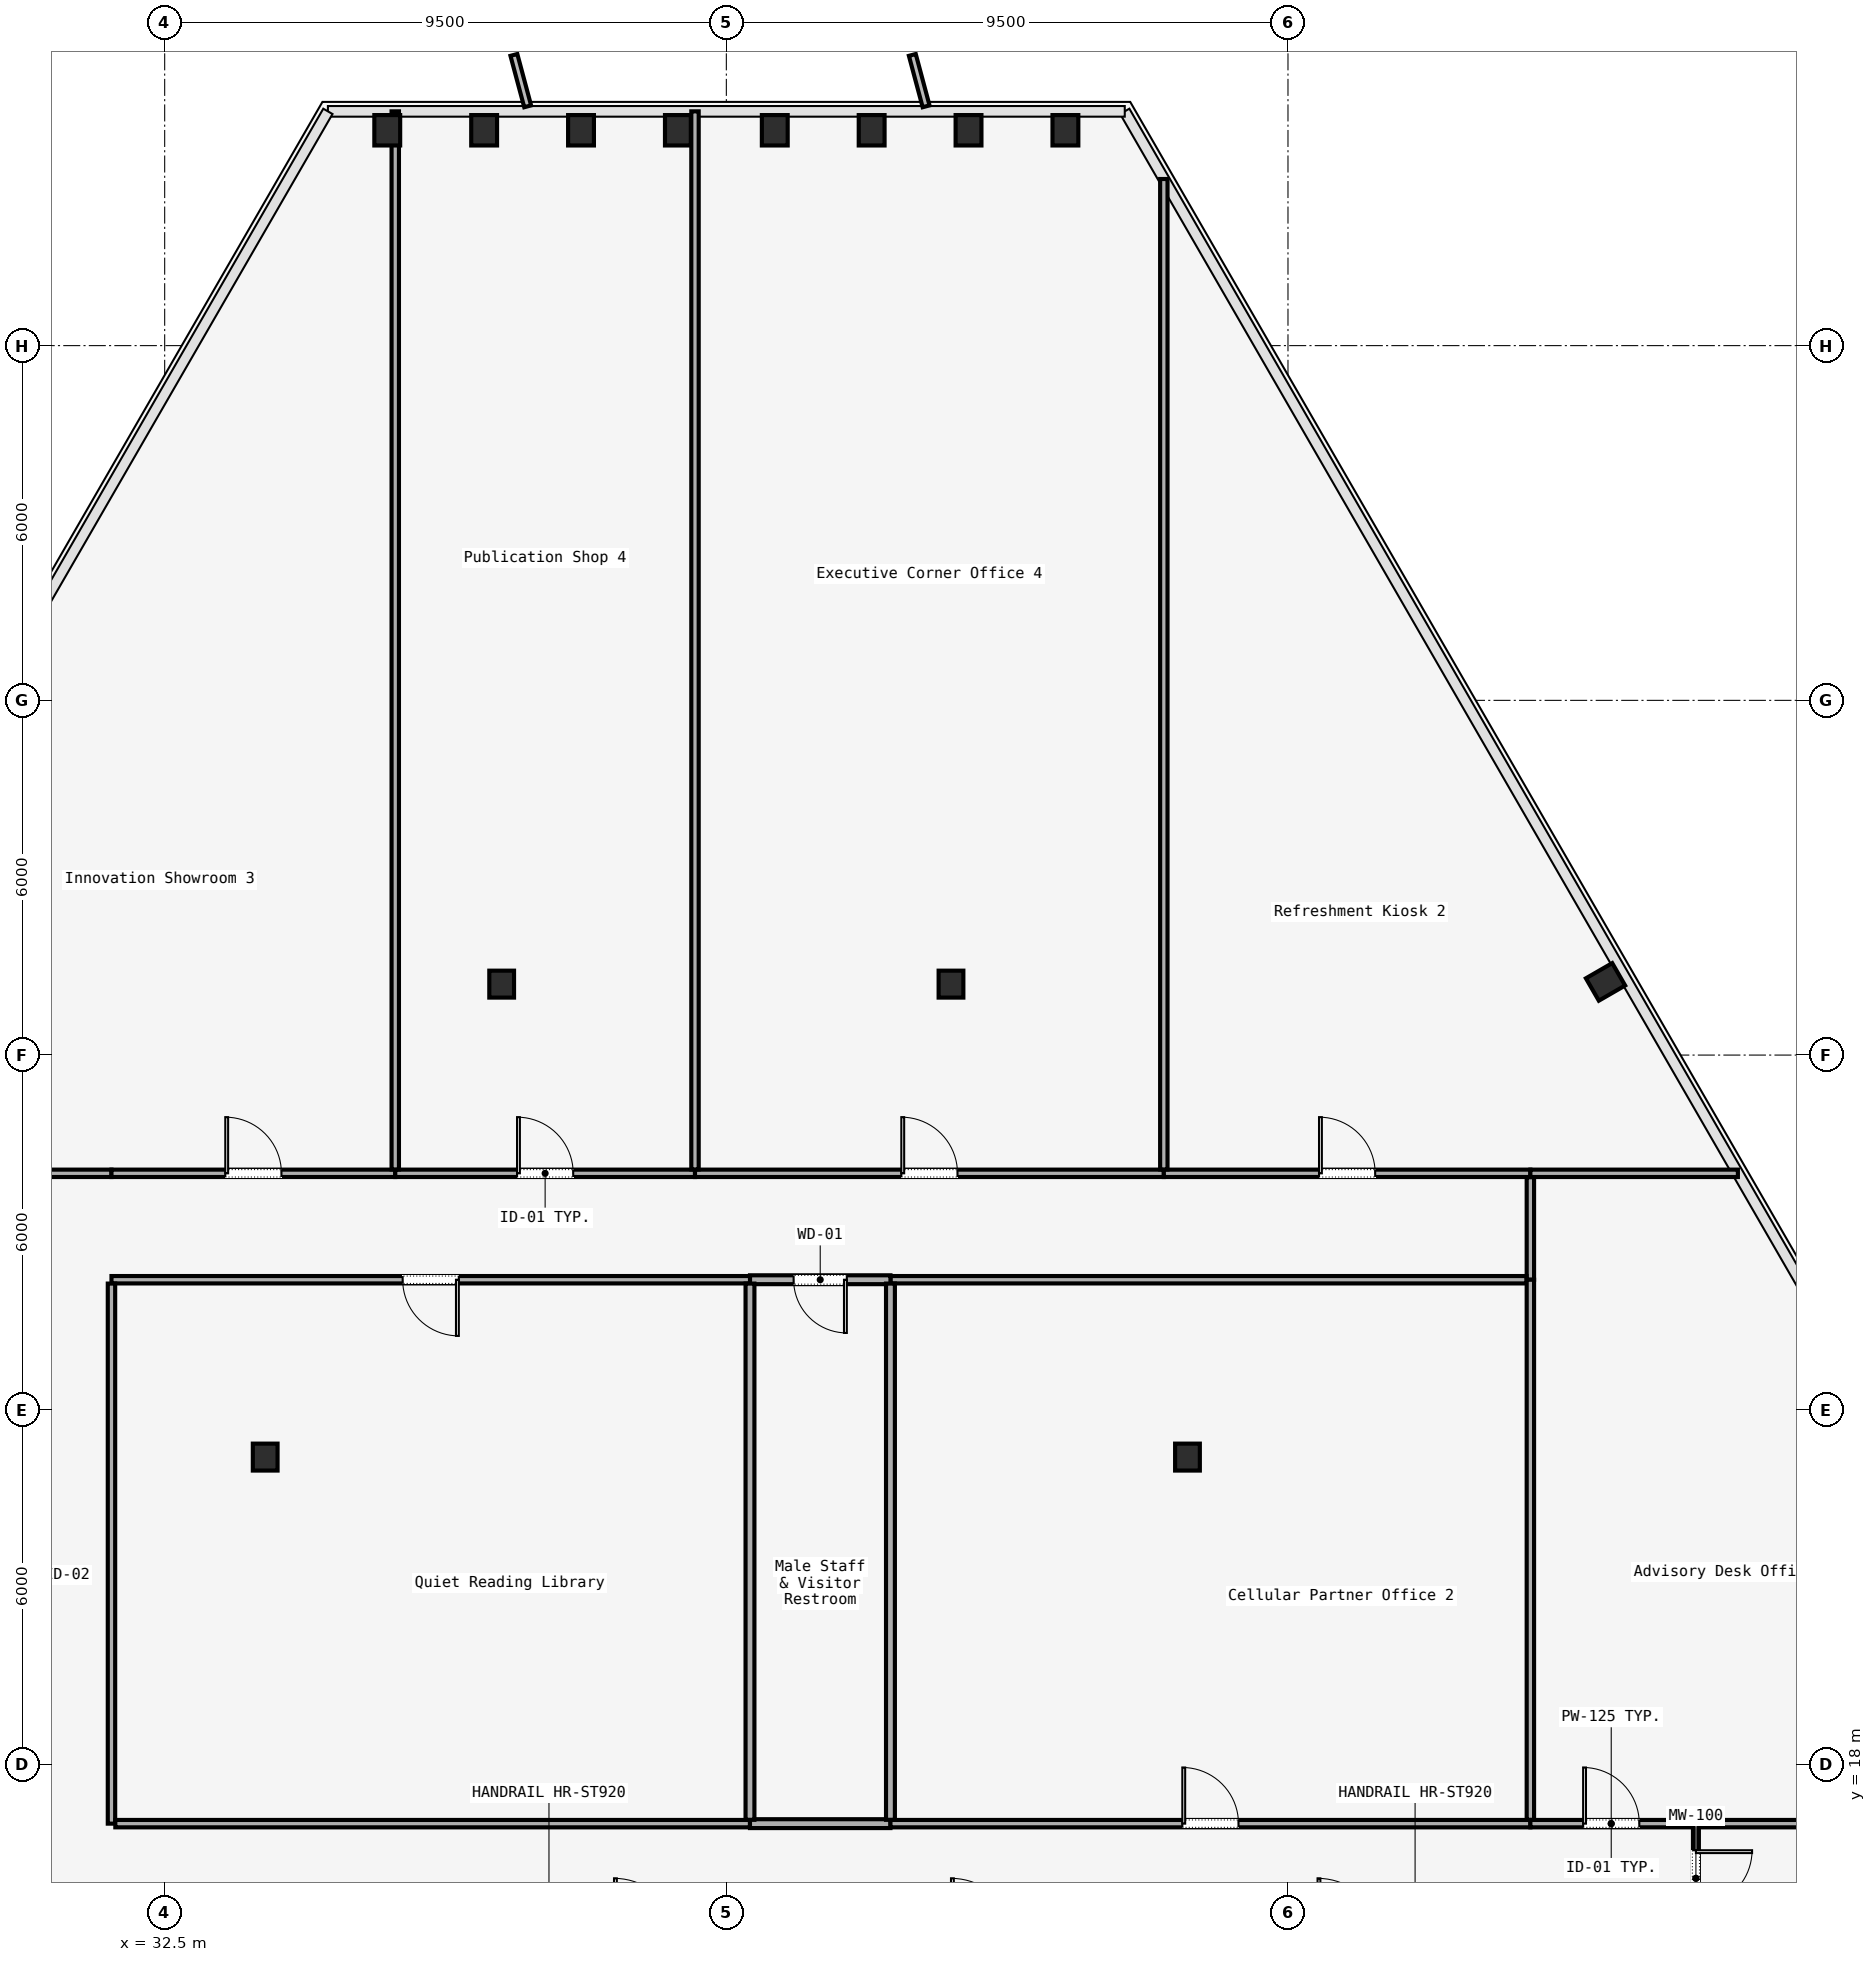
"""IFC4 building model, lengths in metres.
Left out: names, types, materials, properties, quantities, classifications, styles, units other than length and angle.
Written with IfcOpenShell. Run it as: python <this file> out.ifc"""

import sys

from ifc_helpers import new_model, si_unit, direction, frame, frame_2d, origin, origin_2d, place, context, subcontext, project, spatial, rectangle, i_section, extrude, element, fill, save


model = new_model("IFC4")
c1 = context("Model", 3, precision=1e-05, world=origin(), true_north=direction((0.0, 1.0)))
c2 = subcontext(c1, "Body", "Model", "MODEL_VIEW")
j1 = project(units=[si_unit("LENGTHUNIT", "METRE"), si_unit("PLANEANGLEUNIT", "RADIAN")], contexts=[c1])
p1 = place(None, origin())
s1 = spatial("IfcSite", under=j1, at=p1, CompositionType="ELEMENT")
p2 = place(p1, origin())
s2 = spatial("IfcBuilding", under=s1, at=p2, CompositionType="ELEMENT")
p3 = place(p2, frame((0.0, 0.0, 100.6)))
s3 = spatial("IfcBuildingStorey", under=s2, at=p3, CompositionType="ELEMENT", Elevation=100.6)
for number, where, z_axis, x_axis in (
    (1, (34.2, 23.2, 0.0), (0.0, 0.0, 1.0), (1.0, 0.0, 0.0)),
    (2, (49.8, 23.2, 0.0), (0.0, 0.0, 1.0), (1.0, 0.0, 0.0)),
    (3, (38.2, 31.2, 0.0), (0.0, 0.0, 1.0), (1.0, 0.0, 0.0)),
    (4, (45.8, 31.2, 0.0), (0.0, 0.0, 1.0), (1.0, 0.0, 0.0)),
):
    element("IfcColumn", number, at=place(p3, frame(where, z_axis=z_axis, x_axis=x_axis)), inside=s3, PredefinedType="COLUMN", context=c2, shape_type="SweptSolid", body=[
        extrude(i_section(OverallWidth=0.418, OverallDepth=0.456, WebThickness=0.042, FlangeThickness=0.067, FilletRadius=0.015, at=origin_2d()), origin(), (0.0, 0.0, 1.0), 3.58),
    ])
for number, where, z_axis, x_axis in (
    (5, (56.871, 31.238, 0.0), (0.0, 0.0, 1.0), (-0.5, 0.866, 0.0)),
    (6, (47.735, 45.643, 0.0), (0.0, 0.0, 1.0), (1.0, 0.0, 0.0)),
    (7, (46.097, 45.643, 0.0), (0.0, 0.0, 1.0), (1.0, 0.0, 0.0)),
    (8, (44.458, 45.643, 0.0), (0.0, 0.0, 1.0), (1.0, 0.0, 0.0)),
    (9, (42.819, 45.643, 0.0), (0.0, 0.0, 1.0), (1.0, 0.0, 0.0)),
    (10, (41.181, 45.643, 0.0), (0.0, 0.0, 1.0), (1.0, 0.0, 0.0)),
    (11, (39.542, 45.643, 0.0), (0.0, 0.0, 1.0), (1.0, 0.0, 0.0)),
    (12, (37.903, 45.643, 0.0), (0.0, 0.0, 1.0), (1.0, 0.0, 0.0)),
    (13, (36.265, 45.643, 0.0), (0.0, 0.0, 1.0), (1.0, 0.0, 0.0)),
):
    element("IfcColumn", number, at=place(p3, frame(where, z_axis=z_axis, x_axis=x_axis)), inside=s3, PredefinedType="COLUMN", context=c2, shape_type="SweptSolid", body=[
        extrude(i_section(OverallWidth=0.437, OverallDepth=0.514, WebThickness=0.061, FlangeThickness=0.077, FilletRadius=0.015, at=origin_2d()), origin(), (0.0, 0.0, 1.0), 3.58),
    ])
p4 = place(p3, frame((58.4, 17.0, 0.0), z_axis=(0.0, 0.0, 1.0), x_axis=(0.0, -1.0, 0.0)))
e14 = element("IfcWall", 14, at=p4, inside=s3, PredefinedType="MOVABLE", context=c2, shape_type="SweptSolid", body=[
    extrude(rectangle(XDim=1.85, YDim=0.1, at=frame_2d((0.925, 0.0))), origin(), (0.0, 0.0, 1.0), 2.95),
])
p5 = place(p4, frame((0.45, 0.0, 0.0)))
e15 = element("IfcOpeningElement", 15, at=p5, cuts=e14, PredefinedType="OPENING", context=c2, shape_type="SweptSolid", body=[
    extrude(rectangle(XDim=0.95, YDim=2.2, at=frame_2d((0.475, 1.1))), frame((0.0, 0.05, 0.0), z_axis=(0.0, -1.0, 0.0), x_axis=(1.0, 0.0, 0.0)), (0.0, 0.0, 1.0), 0.1),
])
p6 = place(p3, frame((29.865, 28.0, 0.0), z_axis=(0.0, 0.0, 1.0), x_axis=(1.0, 0.0, 0.0)))
e16 = element("IfcWall", 16, at=p6, inside=s3, PredefinedType="PARTITIONING", context=c2, shape_type="SweptSolid", body=[
    extrude(rectangle(XDim=1.735, YDim=0.125, at=frame_2d((0.868, 0.0))), origin(), (0.0, 0.0, 1.0), 2.95),
])
p7 = place(p3, frame((31.6, 28.0, 0.0), z_axis=(0.0, 0.0, 1.0), x_axis=(1.0, 0.0, 0.0)))
e17 = element("IfcWall", 17, at=p7, inside=s3, PredefinedType="PARTITIONING", context=c2, shape_type="SweptSolid", body=[
    extrude(rectangle(XDim=4.8, YDim=0.125, at=frame_2d((2.4, 0.0))), origin(), (0.0, 0.0, 1.0), 2.95),
])
p8 = place(p7, frame((1.925, 0.0, 0.0)))
e18 = element("IfcOpeningElement", 18, at=p8, cuts=e17, PredefinedType="OPENING", context=c2, shape_type="SweptSolid", body=[
    extrude(rectangle(XDim=0.95, YDim=2.2, at=frame_2d((0.475, 1.1))), frame((0.0, 0.062, 0.0), z_axis=(0.0, -1.0, 0.0), x_axis=(1.0, 0.0, 0.0)), (0.0, 0.0, 1.0), 0.125),
])
p9 = place(p3, frame((36.4, 28.0, 0.0), z_axis=(0.0, 0.0, 1.0), x_axis=(1.0, 0.0, 0.0)))
e19 = element("IfcWall", 19, at=p9, inside=s3, PredefinedType="PARTITIONING", context=c2, shape_type="SweptSolid", body=[
    extrude(rectangle(XDim=5.07, YDim=0.125, at=frame_2d((2.535, 0.0))), origin(), (0.0, 0.0, 1.0), 2.95),
])
p10 = place(p9, frame((2.06, 0.0, 0.0)))
e20 = element("IfcOpeningElement", 20, at=p10, cuts=e19, PredefinedType="OPENING", context=c2, shape_type="SweptSolid", body=[
    extrude(rectangle(XDim=0.95, YDim=2.2, at=frame_2d((0.475, 1.1))), frame((0.0, 0.062, 0.0), z_axis=(0.0, -1.0, 0.0), x_axis=(1.0, 0.0, 0.0)), (0.0, 0.0, 1.0), 0.125),
])
p11 = place(p3, frame((41.47, 28.0, 0.0), z_axis=(0.0, 0.0, 1.0), x_axis=(1.0, 0.0, 0.0)))
e21 = element("IfcWall", 21, at=p11, inside=s3, PredefinedType="PARTITIONING", context=c2, shape_type="SweptSolid", body=[
    extrude(rectangle(XDim=7.93, YDim=0.125, at=frame_2d((3.965, 0.0))), origin(), (0.0, 0.0, 1.0), 2.95),
])
p12 = place(p11, frame((3.49, 0.0, 0.0)))
e22 = element("IfcOpeningElement", 22, at=p12, cuts=e21, PredefinedType="OPENING", context=c2, shape_type="SweptSolid", body=[
    extrude(rectangle(XDim=0.95, YDim=2.2, at=frame_2d((0.475, 1.1))), frame((0.0, 0.062, 0.0), z_axis=(0.0, -1.0, 0.0), x_axis=(1.0, 0.0, 0.0)), (0.0, 0.0, 1.0), 0.125),
])
p13 = place(p3, frame((49.4, 28.0, 0.0), z_axis=(0.0, 0.0, 1.0), x_axis=(1.0, 0.0, 0.0)))
e23 = element("IfcWall", 23, at=p13, inside=s3, PredefinedType="PARTITIONING", context=c2, shape_type="SweptSolid", body=[
    extrude(rectangle(XDim=6.2, YDim=0.125, at=frame_2d((3.1, 0.0))), origin(), (0.0, 0.0, 1.0), 2.95),
])
p14 = place(p13, frame((2.625, 0.0, 0.0)))
e24 = element("IfcOpeningElement", 24, at=p14, cuts=e23, PredefinedType="OPENING", context=c2, shape_type="SweptSolid", body=[
    extrude(rectangle(XDim=0.95, YDim=2.2, at=frame_2d((0.475, 1.1))), frame((0.0, 0.062, 0.0), z_axis=(0.0, -1.0, 0.0), x_axis=(1.0, 0.0, 0.0)), (0.0, 0.0, 1.0), 0.125),
])
p15 = place(p3, frame((55.6, 27.935, 0.0), z_axis=(0.0, 0.0, 1.0), x_axis=(0.0, -1.0, 0.0)))
e25 = element("IfcWall", 25, at=p15, inside=s3, PredefinedType="PARTITIONING", context=c2, shape_type="SweptSolid", body=[
    extrude(rectangle(XDim=1.735, YDim=0.125, at=frame_2d((0.868, 0.0))), origin(), (0.0, 0.0, 1.0), 2.95),
])
p16 = place(p3, frame((55.535, 26.2, 0.0), z_axis=(0.0, 0.0, 1.0), x_axis=(-1.0, 0.0, 0.0)))
e26 = element("IfcWall", 26, at=p16, inside=s3, PredefinedType="PARTITIONING", context=c2, shape_type="SweptSolid", body=[
    extrude(rectangle(XDim=10.759, YDim=0.125, at=frame_2d((5.379, 0.0))), origin(), (0.0, 0.0, 1.0), 2.95),
])
p17 = place(p3, frame((44.776, 26.2, 0.0), z_axis=(0.0, 0.0, 1.0), x_axis=(-1.0, 0.0, 0.0)))
e27 = element("IfcWall", 27, at=p17, inside=s3, PredefinedType="PARTITIONING", context=c2, shape_type="SweptSolid", body=[
    extrude(rectangle(XDim=2.376, YDim=0.15, at=frame_2d((1.188, 0.0))), origin(), (0.0, 0.0, 1.0), 2.95),
])
p18 = place(p17, frame((0.738, 0.0, 0.0)))
e28 = element("IfcOpeningElement", 28, at=p18, cuts=e27, PredefinedType="OPENING", context=c2, shape_type="SweptSolid", body=[
    extrude(rectangle(XDim=0.9, YDim=2.15, at=frame_2d((0.45, 1.075))), frame((0.0, 0.075, 0.0), z_axis=(0.0, -1.0, 0.0), x_axis=(1.0, 0.0, 0.0)), (0.0, 0.0, 1.0), 0.15),
])
p19 = place(p3, frame((42.4, 26.2, 0.0), z_axis=(0.0, 0.0, 1.0), x_axis=(-1.0, 0.0, 0.0)))
e29 = element("IfcWall", 29, at=p19, inside=s3, PredefinedType="PARTITIONING", context=c2, shape_type="SweptSolid", body=[
    extrude(rectangle(XDim=10.8, YDim=0.125, at=frame_2d((5.4, 0.0))), origin(), (0.0, 0.0, 1.0), 2.95),
])
p20 = place(p19, frame((4.925, 0.0, 0.0)))
e30 = element("IfcOpeningElement", 30, at=p20, cuts=e29, PredefinedType="OPENING", context=c2, shape_type="SweptSolid", body=[
    extrude(rectangle(XDim=0.95, YDim=2.2, at=frame_2d((0.475, 1.1))), frame((0.0, 0.062, 0.0), z_axis=(0.0, -1.0, 0.0), x_axis=(1.0, 0.0, 0.0)), (0.0, 0.0, 1.0), 0.125),
])
p21 = place(p3, frame((31.6, 26.135, 0.0), z_axis=(0.0, 0.0, 1.0), x_axis=(0.0, -1.0, 0.0)))
e31 = element("IfcWall", 31, at=p21, inside=s3, PredefinedType="PARTITIONING", context=c2, shape_type="SweptSolid", body=[
    extrude(rectangle(XDim=9.135, YDim=0.125, at=frame_2d((4.567, 0.0))), origin(), (0.0, 0.0, 1.0), 2.95),
])
p22 = place(p3, frame((31.665, 17.0, 0.0), z_axis=(0.0, 0.0, 1.0), x_axis=(1.0, 0.0, 0.0)))
e32 = element("IfcWall", 32, at=p22, inside=s3, PredefinedType="PARTITIONING", context=c2, shape_type="SweptSolid", body=[
    extrude(rectangle(XDim=10.735, YDim=0.125, at=frame_2d((5.367, 0.0))), origin(), (0.0, 0.0, 1.0), 2.95),
])
p23 = place(p3, frame((42.4, 17.0, 0.0), z_axis=(0.0, 0.0, 1.0), x_axis=(1.0, 0.0, 0.0)))
e33 = element("IfcWall", 33, at=p23, inside=s3, PredefinedType="PARTITIONING", context=c2, shape_type="SweptSolid", body=[
    extrude(rectangle(XDim=2.376, YDim=0.15, at=frame_2d((1.188, 0.0))), origin(), (0.0, 0.0, 1.0), 2.95),
])
p24 = place(p3, frame((44.776, 17.0, 0.0), z_axis=(0.0, 0.0, 1.0), x_axis=(1.0, 0.0, 0.0)))
e34 = element("IfcWall", 34, at=p24, inside=s3, PredefinedType="PARTITIONING", context=c2, shape_type="SweptSolid", body=[
    extrude(rectangle(XDim=10.824, YDim=0.125, at=frame_2d((5.412, 0.0))), origin(), (0.0, 0.0, 1.0), 2.95),
])
p25 = place(p24, frame((4.937, 0.0, 0.0)))
e35 = element("IfcOpeningElement", 35, at=p25, cuts=e34, PredefinedType="OPENING", context=c2, shape_type="SweptSolid", body=[
    extrude(rectangle(XDim=0.95, YDim=2.2, at=frame_2d((0.475, 1.1))), frame((0.0, 0.062, 0.0), z_axis=(0.0, -1.0, 0.0), x_axis=(1.0, 0.0, 0.0)), (0.0, 0.0, 1.0), 0.125),
])
p26 = place(p3, frame((55.6, 17.0, 0.0), z_axis=(0.0, 0.0, 1.0), x_axis=(1.0, 0.0, 0.0)))
e36 = element("IfcWall", 36, at=p26, inside=s3, PredefinedType="PARTITIONING", context=c2, shape_type="SweptSolid", body=[
    extrude(rectangle(XDim=2.735, YDim=0.125, at=frame_2d((1.367, 0.0))), origin(), (0.0, 0.0, 1.0), 2.95),
])
p27 = place(p26, frame((0.893, 0.0, 0.0)))
e37 = element("IfcOpeningElement", 37, at=p27, cuts=e36, PredefinedType="OPENING", context=c2, shape_type="SweptSolid", body=[
    extrude(rectangle(XDim=0.95, YDim=2.2, at=frame_2d((0.475, 1.1))), frame((0.0, 0.062, 0.0), z_axis=(0.0, -1.0, 0.0), x_axis=(1.0, 0.0, 0.0)), (0.0, 0.0, 1.0), 0.125),
])
p28 = place(p3, frame((58.465, 17.0, 0.0), z_axis=(0.0, 0.0, 1.0), x_axis=(1.0, 0.0, 0.0)))
e38 = element("IfcWall", 38, at=p28, inside=s3, PredefinedType="PARTITIONING", context=c2, shape_type="SweptSolid", body=[
    extrude(rectangle(XDim=2.735, YDim=0.125, at=frame_2d((1.367, 0.0))), origin(), (0.0, 0.0, 1.0), 2.95),
])
for number, where, z_axis, x_axis in (
    (39, (42.4, 26.135, 0.0), (0.0, 0.0, 1.0), (0.0, -1.0, 0.0)),
    (40, (44.776, 26.135, 0.0), (0.0, 0.0, 1.0), (0.0, -1.0, 0.0)),
):
    element("IfcWall", number, at=place(p3, frame(where, z_axis=z_axis, x_axis=x_axis)), inside=s3, PredefinedType="PARTITIONING", context=c2, shape_type="SweptSolid", body=[
        extrude(rectangle(XDim=9.07, YDim=0.15, at=frame_2d((4.535, 0.0))), origin(), (0.0, 0.0, 1.0), 2.95),
    ])
p29 = place(p3, frame((55.6, 26.2, 0.0), z_axis=(0.0, 0.0, 1.0), x_axis=(0.0, -1.0, 0.0)))
e41 = element("IfcWall", 41, at=p29, inside=s3, PredefinedType="PARTITIONING", context=c2, shape_type="SweptSolid", body=[
    extrude(rectangle(XDim=9.135, YDim=0.125, at=frame_2d((4.567, 0.0))), origin(), (0.0, 0.0, 1.0), 2.95),
])
p30 = place(p3, frame((55.6, 28.0, 0.0), z_axis=(0.0, 0.0, 1.0), x_axis=(1.0, 0.0, 0.0)))
e42 = element("IfcWall", 42, at=p30, inside=s3, PredefinedType="PARTITIONING", context=c2, shape_type="SweptSolid", body=[
    extrude(rectangle(XDim=3.51, YDim=0.125, at=frame_2d((1.755, 0.0))), origin(), (0.0, 0.0, 1.0), 2.95),
])
p31 = place(p3, frame((49.4, 28.065, 0.0), z_axis=(0.0, 0.0, 1.0), x_axis=(0.0, 1.0, 0.0)))
e43 = element("IfcWall", 43, at=p31, inside=s3, PredefinedType="PARTITIONING", context=c2, shape_type="SweptSolid", body=[
    extrude(rectangle(XDim=16.753, YDim=0.125, at=frame_2d((8.377, 0.0))), origin(), (0.0, 0.0, 1.0), 2.95),
])
for number, where, z_axis, x_axis in (
    (44, (36.4, 45.963, 0.0), (0.0, 0.0, 1.0), (0.0, -1.0, 0.0)),
    (45, (41.47, 28.065, 0.0), (0.0, 0.0, 1.0), (0.0, 1.0, 0.0)),
):
    element("IfcWall", number, at=place(p3, frame(where, z_axis=z_axis, x_axis=x_axis)), inside=s3, PredefinedType="PARTITIONING", context=c2, shape_type="SweptSolid", body=[
        extrude(rectangle(XDim=17.898, YDim=0.125, at=frame_2d((8.949, 0.0))), origin(), (0.0, 0.0, 1.0), 2.95),
    ])
p32 = place(p5, origin())
e46 = element("IfcDoor", 46, at=p32, inside=s3, OperationType="SINGLE_SWING_LEFT", PredefinedType="DOOR", context=c2, shape_type="SweptSolid", body=[
    extrude(rectangle(XDim=0.95, YDim=2.2, at=frame_2d((0.475, 1.1))), frame((0.0, 0.025, 0.0), z_axis=(0.0, -1.0, 0.0), x_axis=(1.0, 0.0, 0.0)), (0.0, 0.0, 1.0), 0.05),
])
fill(e15, e46)
p33 = place(p20, origin())
e47 = element("IfcDoor", 47, at=p33, inside=s3, OperationType="SINGLE_SWING_LEFT", PredefinedType="DOOR", context=c2, shape_type="SweptSolid", body=[
    extrude(rectangle(XDim=0.95, YDim=2.2, at=frame_2d((0.475, 1.1))), frame((0.0, 0.025, 0.0), z_axis=(0.0, -1.0, 0.0), x_axis=(1.0, 0.0, 0.0)), (0.0, 0.0, 1.0), 0.05),
])
fill(e30, e47)
p34 = place(p18, origin())
e48 = element("IfcDoor", 48, at=p34, inside=s3, OperationType="SINGLE_SWING_RIGHT", PredefinedType="DOOR", context=c2, shape_type="SweptSolid", body=[
    extrude(rectangle(XDim=0.9, YDim=2.15, at=frame_2d((0.45, 1.075))), frame((0.0, 0.025, 0.0), z_axis=(0.0, -1.0, 0.0), x_axis=(1.0, 0.0, 0.0)), (0.0, 0.0, 1.0), 0.05),
])
fill(e28, e48)
p35 = place(p25, origin())
e49 = element("IfcDoor", 49, at=p35, inside=s3, OperationType="SINGLE_SWING_LEFT", PredefinedType="DOOR", context=c2, shape_type="SweptSolid", body=[
    extrude(rectangle(XDim=0.95, YDim=2.2, at=frame_2d((0.475, 1.1))), frame((0.0, 0.025, 0.0), z_axis=(0.0, -1.0, 0.0), x_axis=(1.0, 0.0, 0.0)), (0.0, 0.0, 1.0), 0.05),
])
fill(e35, e49)
p36 = place(p27, origin())
e50 = element("IfcDoor", 50, at=p36, inside=s3, OperationType="SINGLE_SWING_RIGHT", PredefinedType="DOOR", context=c2, shape_type="SweptSolid", body=[
    extrude(rectangle(XDim=0.95, YDim=2.2, at=frame_2d((0.475, 1.1))), frame((0.0, 0.025, 0.0), z_axis=(0.0, -1.0, 0.0), x_axis=(1.0, 0.0, 0.0)), (0.0, 0.0, 1.0), 0.05),
])
fill(e37, e50)
p37 = place(p14, origin())
e51 = element("IfcDoor", 51, at=p37, inside=s3, OperationType="SINGLE_SWING_RIGHT", PredefinedType="DOOR", context=c2, shape_type="SweptSolid", body=[
    extrude(rectangle(XDim=0.95, YDim=2.2, at=frame_2d((0.475, 1.1))), frame((0.0, 0.025, 0.0), z_axis=(0.0, -1.0, 0.0), x_axis=(1.0, 0.0, 0.0)), (0.0, 0.0, 1.0), 0.05),
])
fill(e24, e51)
p38 = place(p8, origin())
e52 = element("IfcDoor", 52, at=p38, inside=s3, OperationType="SINGLE_SWING_LEFT", PredefinedType="DOOR", context=c2, shape_type="SweptSolid", body=[
    extrude(rectangle(XDim=0.95, YDim=2.2, at=frame_2d((0.475, 1.1))), frame((0.0, 0.025, 0.0), z_axis=(0.0, -1.0, 0.0), x_axis=(1.0, 0.0, 0.0)), (0.0, 0.0, 1.0), 0.05),
])
fill(e18, e52)
p39 = place(p12, origin())
e53 = element("IfcDoor", 53, at=p39, inside=s3, OperationType="SINGLE_SWING_RIGHT", PredefinedType="DOOR", context=c2, shape_type="SweptSolid", body=[
    extrude(rectangle(XDim=0.95, YDim=2.2, at=frame_2d((0.475, 1.1))), frame((0.0, 0.025, 0.0), z_axis=(0.0, -1.0, 0.0), x_axis=(1.0, 0.0, 0.0)), (0.0, 0.0, 1.0), 0.05),
])
fill(e22, e53)
p40 = place(p10, origin())
e54 = element("IfcDoor", 54, at=p40, inside=s3, OperationType="SINGLE_SWING_LEFT", PredefinedType="DOOR", context=c2, shape_type="SweptSolid", body=[
    extrude(rectangle(XDim=0.95, YDim=2.2, at=frame_2d((0.475, 1.1))), frame((0.0, 0.025, 0.0), z_axis=(0.0, -1.0, 0.0), x_axis=(1.0, 0.0, 0.0)), (0.0, 0.0, 1.0), 0.05),
])
fill(e20, e54)
save(model, sys.argv[1])
